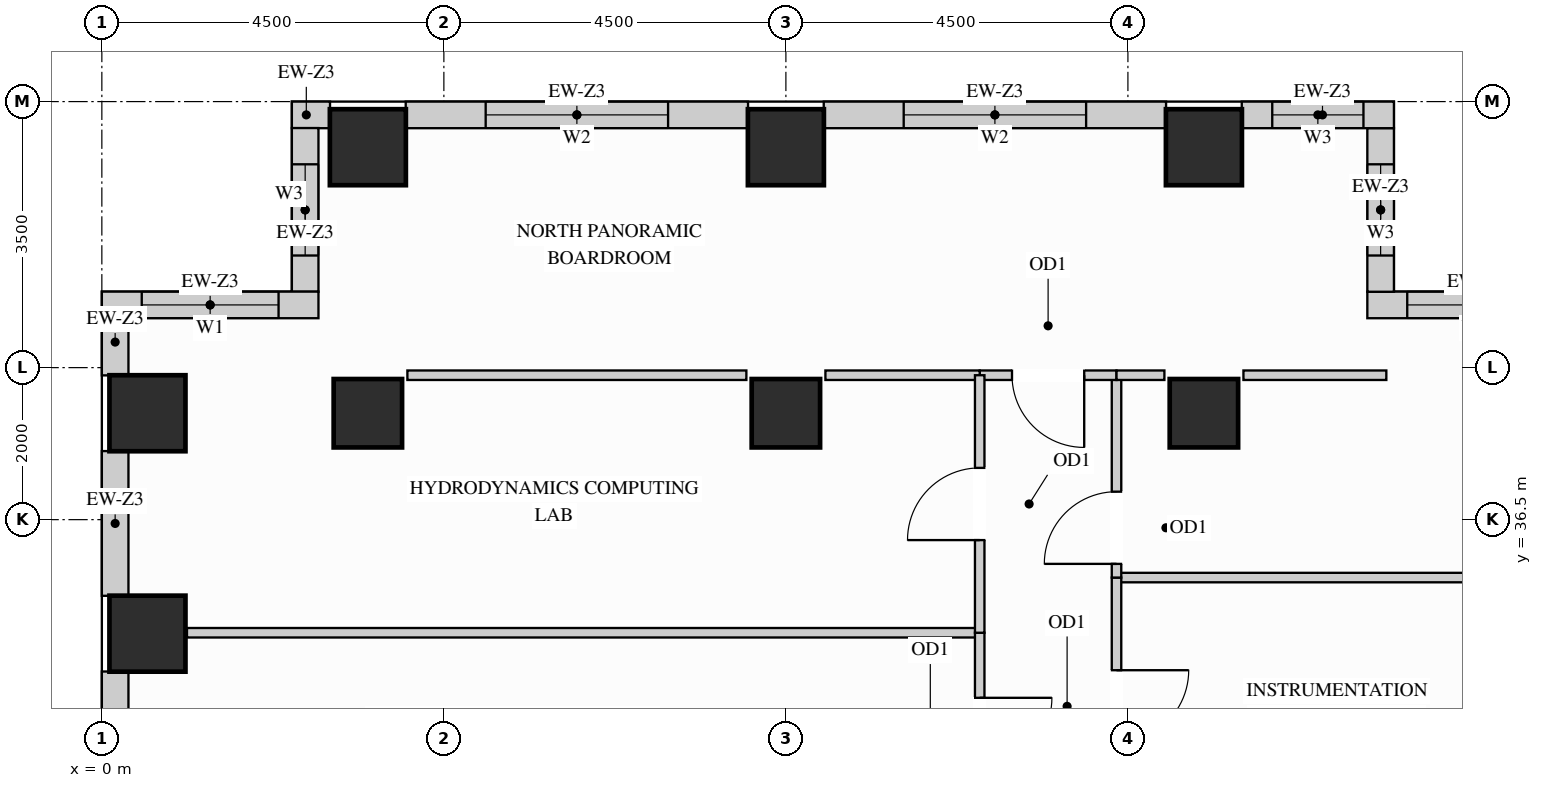
"""IFC4 building model, lengths in metres.
Left out: names, types, materials, properties, quantities, classifications, styles, units other than length and angle.
Written with IfcOpenShell. Run it as: python <this file> out.ifc"""

import sys

from ifc_helpers import new_model, si_unit, direction, frame, frame_2d, origin, origin_2d, place, context, subcontext, project, spatial, rectangle, extrude, source, transform, mapped, element, fill, save


model = new_model("IFC4")
c1 = context("Model", 3, precision=1e-05, world=origin(), true_north=direction((0.0, 1.0)))
c2 = subcontext(c1, "Body", "Model", "MODEL_VIEW")
j1 = project(units=[si_unit("LENGTHUNIT", "METRE"), si_unit("PLANEANGLEUNIT", "RADIAN")], contexts=[c1])
p1 = place(None, origin())
s1 = spatial("IfcSite", under=j1, at=p1, CompositionType="ELEMENT")
p2 = place(p1, origin())
s2 = spatial("IfcBuilding", under=s1, at=p2, CompositionType="ELEMENT")
p3 = place(p2, frame((0.0, 0.0, 161.1)))
s3 = spatial("IfcBuildingStorey", under=s2, at=p3, CompositionType="ELEMENT", Elevation=161.1)
m1 = source(origin(), c2, "Body", "SweptSolid", [
    extrude(rectangle(XDim=0.9, YDim=0.9, at=origin_2d()), origin(), (0.0, 0.0, 1.0), 3.4),
])
for number, where, z_axis, x_axis in (
    (1, (14.5, 37.9, 0.0), (0.0, 0.0, 1.0), (1.0, 0.0, 0.0)),
    (2, (3.5, 37.9, 0.0), (0.0, 0.0, 1.0), (1.0, 0.0, 0.0)),
    (3, (9.0, 37.9, 0.0), (0.0, 0.0, 1.0), (1.0, 0.0, 0.0)),
):
    element("IfcColumn", number, at=place(p3, frame(where, z_axis=z_axis, x_axis=x_axis)), inside=s3, PredefinedType="COLUMN", context=c2, shape_type="MappedRepresentation", body=[
        mapped(m1, transform((0.0, 0.0, 0.0), x_axis=(1.0, 0.0, 0.0), y_axis=(0.0, 1.0, 0.0), z_axis=(0.0, 0.0, 1.0))),
    ])
m2 = source(origin(), c2, "Body", "SweptSolid", [
    extrude(rectangle(XDim=1.0, YDim=1.0, at=origin_2d()), origin(), (0.0, 0.0, 1.0), 3.4),
])
for number, where, z_axis, x_axis in (
    (4, (14.5, 41.4, 0.0), (0.0, 0.0, 1.0), (1.0, 0.0, 0.0)),
    (5, (3.5, 41.4, 0.0), (0.0, 0.0, 1.0), (1.0, 0.0, 0.0)),
    (6, (9.0, 41.4, 0.0), (0.0, 0.0, 1.0), (1.0, 0.0, 0.0)),
    (7, (0.6, 35.0, 0.0), (0.0, 0.0, 1.0), (1.0, 0.0, 0.0)),
    (8, (0.6, 37.9, 0.0), (0.0, 0.0, 1.0), (1.0, 0.0, 0.0)),
):
    element("IfcColumn", number, at=place(p3, frame(where, z_axis=z_axis, x_axis=x_axis)), inside=s3, PredefinedType="COLUMN", context=c2, shape_type="MappedRepresentation", body=[
        mapped(m2, transform((0.0, 0.0, 0.0), x_axis=(1.0, 0.0, 0.0), y_axis=(0.0, 1.0, 0.0), z_axis=(0.0, 0.0, 1.0))),
    ])
p4 = place(p3, frame((19.5, 39.325, 0.0), z_axis=(0.0, 0.0, 1.0), x_axis=(-1.0, 0.0, 0.0)))
e9 = element("IfcWall", 9, at=p4, inside=s3, PredefinedType="SOLIDWALL", context=c2, shape_type="SweptSolid", body=[
    extrude(rectangle(XDim=2.85, YDim=0.35, at=frame_2d((1.425, 0.0))), origin(), (0.0, 0.0, 1.0), 3.385),
])
p5 = place(p4, frame((0.525, 0.0, 0.78)))
e10 = element("IfcOpeningElement", 10, at=p5, cuts=e9, PredefinedType="OPENING", context=c2, shape_type="SweptSolid", body=[
    extrude(rectangle(XDim=1.8, YDim=2.1, at=frame_2d((0.9, 1.05))), frame((0.0, 0.185, 0.0), z_axis=(0.0, -1.0, 0.0), x_axis=(1.0, 0.0, 0.0)), (0.0, 0.0, 1.0), 0.37),
])
p6 = place(p3, frame((16.825, 39.498, 0.0), z_axis=(0.0, 0.0, 1.0), x_axis=(0.0, 1.0, 0.0)))
e11 = element("IfcWall", 11, at=p6, inside=s3, PredefinedType="SOLIDWALL", context=c2, shape_type="SweptSolid", body=[
    extrude(rectangle(XDim=2.154, YDim=0.35, at=frame_2d((1.077, 0.0))), origin(), (0.0, 0.0, 1.0), 3.385),
])
p7 = place(p6, frame((0.477, 0.0, 0.78)))
e12 = element("IfcOpeningElement", 12, at=p7, cuts=e11, PredefinedType="OPENING", context=c2, shape_type="SweptSolid", body=[
    extrude(rectangle(XDim=1.2, YDim=2.1, at=frame_2d((0.6, 1.05))), frame((0.0, 0.185, 0.0), z_axis=(0.0, -1.0, 0.0), x_axis=(1.0, 0.0, 0.0)), (0.0, 0.0, 1.0), 0.37),
])
p8 = place(p3, frame((17.0, 41.825, 0.0), z_axis=(0.0, 0.0, 1.0), x_axis=(-1.0, 0.0, 0.0)))
e13 = element("IfcWall", 13, at=p8, inside=s3, PredefinedType="SOLIDWALL", context=c2, shape_type="SweptSolid", body=[
    extrude(rectangle(XDim=2.002, YDim=0.35, at=frame_2d((1.001, 0.0))), origin(), (0.0, 0.0, 1.0), 3.385),
])
p9 = place(p8, frame((0.401, 0.0, 0.78)))
e14 = element("IfcOpeningElement", 14, at=p9, cuts=e13, PredefinedType="OPENING", context=c2, shape_type="SweptSolid", body=[
    extrude(rectangle(XDim=1.2, YDim=2.1, at=frame_2d((0.6, 1.05))), frame((0.0, 0.185, 0.0), z_axis=(0.0, -1.0, 0.0), x_axis=(1.0, 0.0, 0.0)), (0.0, 0.0, 1.0), 0.37),
])
p10 = place(p3, frame((14.002, 41.825, 0.0), z_axis=(0.0, 0.0, 1.0), x_axis=(-1.0, 0.0, 0.0)))
e15 = element("IfcWall", 15, at=p10, inside=s3, PredefinedType="SOLIDWALL", context=c2, shape_type="SweptSolid", body=[
    extrude(rectangle(XDim=4.504, YDim=0.35, at=frame_2d((2.252, 0.0))), origin(), (0.0, 0.0, 1.0), 2.612),
])
p11 = place(p10, frame((1.052, 0.0, 0.78)))
e16 = element("IfcOpeningElement", 16, at=p11, cuts=e15, PredefinedType="OPENING", context=c2, shape_type="SweptSolid", body=[
    extrude(rectangle(XDim=2.4, YDim=1.652, at=frame_2d((1.2, 0.826))), frame((0.0, 0.185, 0.0), z_axis=(0.0, -1.0, 0.0), x_axis=(1.0, 0.0, 0.0)), (0.0, 0.0, 1.0), 0.37),
])
p12 = place(p3, frame((8.502, 41.825, 0.0), z_axis=(0.0, 0.0, 1.0), x_axis=(-1.0, 0.0, 0.0)))
e17 = element("IfcWall", 17, at=p12, inside=s3, PredefinedType="SOLIDWALL", context=c2, shape_type="SweptSolid", body=[
    extrude(rectangle(XDim=4.504, YDim=0.35, at=frame_2d((2.252, 0.0))), origin(), (0.0, 0.0, 1.0), 2.612),
])
p13 = place(p12, frame((1.052, 0.0, 0.78)))
e18 = element("IfcOpeningElement", 18, at=p13, cuts=e17, PredefinedType="OPENING", context=c2, shape_type="SweptSolid", body=[
    extrude(rectangle(XDim=2.4, YDim=1.652, at=frame_2d((1.2, 0.826))), frame((0.0, 0.185, 0.0), z_axis=(0.0, -1.0, 0.0), x_axis=(1.0, 0.0, 0.0)), (0.0, 0.0, 1.0), 0.37),
])
m3 = source(origin(), c2, "Body", "SweptSolid", [
    extrude(rectangle(XDim=0.502, YDim=0.35, at=frame_2d((0.251, 0.0))), origin(), (0.0, 0.0, 1.0), 3.385),
])
p14 = place(p3, frame((3.002, 41.825, 0.0), z_axis=(0.0, 0.0, 1.0), x_axis=(-1.0, 0.0, 0.0)))
e19 = element("IfcWall", 19, at=p14, inside=s3, PredefinedType="SOLIDWALL", context=c2, shape_type="MappedRepresentation", body=[
    mapped(m3, transform((0.0, 0.0, 0.0), x_axis=(1.0, 0.0, 0.0), y_axis=(0.0, 1.0, 0.0), z_axis=(0.0, 0.0, 1.0))),
])
p15 = place(p3, frame((2.675, 41.652, 0.0), z_axis=(0.0, 0.0, 1.0), x_axis=(0.0, -1.0, 0.0)))
e20 = element("IfcWall", 20, at=p15, inside=s3, PredefinedType="SOLIDWALL", context=c2, shape_type="SweptSolid", body=[
    extrude(rectangle(XDim=2.154, YDim=0.35, at=frame_2d((1.077, 0.0))), origin(), (0.0, 0.0, 1.0), 3.385),
])
p16 = place(p15, frame((0.477, 0.0, 0.78)))
e21 = element("IfcOpeningElement", 21, at=p16, cuts=e20, PredefinedType="OPENING", context=c2, shape_type="SweptSolid", body=[
    extrude(rectangle(XDim=1.2, YDim=2.1, at=frame_2d((0.6, 1.05))), frame((0.0, 0.185, 0.0), z_axis=(0.0, -1.0, 0.0), x_axis=(1.0, 0.0, 0.0)), (0.0, 0.0, 1.0), 0.37),
])
p17 = place(p3, frame((2.85, 39.325, 0.0), z_axis=(0.0, 0.0, 1.0), x_axis=(-1.0, 0.0, 0.0)))
e22 = element("IfcWall", 22, at=p17, inside=s3, PredefinedType="SOLIDWALL", context=c2, shape_type="SweptSolid", body=[
    extrude(rectangle(XDim=2.85, YDim=0.35, at=frame_2d((1.425, 0.0))), origin(), (0.0, 0.0, 1.0), 3.385),
])
p18 = place(p17, frame((0.525, 0.0, 0.78)))
e23 = element("IfcOpeningElement", 23, at=p18, cuts=e22, PredefinedType="OPENING", context=c2, shape_type="SweptSolid", body=[
    extrude(rectangle(XDim=1.8, YDim=2.1, at=frame_2d((0.9, 1.05))), frame((0.0, 0.185, 0.0), z_axis=(0.0, -1.0, 0.0), x_axis=(1.0, 0.0, 0.0)), (0.0, 0.0, 1.0), 0.37),
])
m4 = source(origin(), c2, "Body", "SweptSolid", [
    extrude(rectangle(XDim=0.754, YDim=0.35, at=frame_2d((0.377, 0.0))), origin(), (0.0, 0.0, 1.0), 3.385),
])
p19 = place(p3, frame((0.175, 39.152, 0.0), z_axis=(0.0, 0.0, 1.0), x_axis=(0.0, -1.0, 0.0)))
e24 = element("IfcWall", 24, at=p19, inside=s3, PredefinedType="SOLIDWALL", context=c2, shape_type="MappedRepresentation", body=[
    mapped(m4, transform((0.0, 0.0, 0.0), x_axis=(1.0, 0.0, 0.0), y_axis=(0.0, 1.0, 0.0), z_axis=(0.0, 0.0, 1.0))),
])
m5 = source(origin(), c2, "Body", "SweptSolid", [
    extrude(rectangle(XDim=1.904, YDim=0.35, at=frame_2d((0.952, 0.0))), origin(), (0.0, 0.0, 1.0), 2.612),
])
p20 = place(p3, frame((0.175, 37.402, 0.0), z_axis=(0.0, 0.0, 1.0), x_axis=(0.0, -1.0, 0.0)))
e25 = element("IfcWall", 25, at=p20, inside=s3, PredefinedType="SOLIDWALL", context=c2, shape_type="MappedRepresentation", body=[
    mapped(m5, transform((0.0, 0.0, 0.0), x_axis=(1.0, 0.0, 0.0), y_axis=(0.0, 1.0, 0.0), z_axis=(0.0, 0.0, 1.0))),
])
p21 = place(p3, frame((0.175, 34.502, 0.0), z_axis=(0.0, 0.0, 1.0), x_axis=(0.0, -1.0, 0.0)))
e26 = element("IfcWall", 26, at=p21, inside=s3, PredefinedType="SOLIDWALL", context=c2, shape_type="SweptSolid", body=[
    extrude(rectangle(XDim=3.504, YDim=0.35, at=frame_2d((1.752, 0.0))), origin(), (0.0, 0.0, 1.0), 2.612),
])
p22 = place(p21, frame((0.511, 0.0, 0.78)))
e27 = element("IfcOpeningElement", 27, at=p22, cuts=e26, PredefinedType="OPENING", context=c2, shape_type="SweptSolid", body=[
    extrude(rectangle(XDim=1.2, YDim=1.652, at=frame_2d((0.6, 0.826))), frame((0.0, 0.185, 0.0), z_axis=(0.0, -1.0, 0.0), x_axis=(1.0, 0.0, 0.0)), (0.0, 0.0, 1.0), 0.37),
])
m6 = source(origin(), c2, "Body", "SweptSolid", [
    extrude(rectangle(XDim=5.798, YDim=0.125, at=frame_2d((2.899, 0.0))), origin(), (0.0, 0.0, 1.0), 3.385),
])
p23 = place(p3, frame((13.35, 35.738, 0.0), z_axis=(0.0, 0.0, 1.0), x_axis=(1.0, 0.0, 0.0)))
e28 = element("IfcWall", 28, at=p23, inside=s3, PredefinedType="PARTITIONING", context=c2, shape_type="MappedRepresentation", body=[
    mapped(m6, transform((0.0, 0.0, 0.0), x_axis=(1.0, 0.0, 0.0), y_axis=(0.0, 1.0, 0.0), z_axis=(0.0, 0.0, 1.0))),
])
m7 = source(origin(), c2, "Body", "SweptSolid", [
    extrude(rectangle(XDim=10.43, YDim=0.125, at=frame_2d((5.215, 0.0))), origin(), (0.0, 0.0, 1.0), 3.385),
])
p24 = place(p3, frame((1.12, 35.012, 0.0), z_axis=(0.0, 0.0, 1.0), x_axis=(1.0, 0.0, 0.0)))
e29 = element("IfcWall", 29, at=p24, inside=s3, PredefinedType="PARTITIONING", context=c2, shape_type="MappedRepresentation", body=[
    mapped(m7, transform((0.0, 0.0, 0.0), x_axis=(1.0, 0.0, 0.0), y_axis=(0.0, 1.0, 0.0), z_axis=(0.0, 0.0, 1.0))),
])
p25 = place(p3, frame((13.35, 32.35, 0.0), z_axis=(0.0, 0.0, 1.0), x_axis=(0.0, 1.0, 0.0)))
e30 = element("IfcWall", 30, at=p25, inside=s3, PredefinedType="PARTITIONING", context=c2, shape_type="SweptSolid", body=[
    extrude(rectangle(XDim=3.388, YDim=0.125, at=frame_2d((1.694, 0.0))), origin(), (0.0, 0.0, 1.0), 3.385),
])
p26 = place(p25, frame((1.219, 0.0, 0.0)))
e31 = element("IfcOpeningElement", 31, at=p26, cuts=e30, PredefinedType="OPENING", context=c2, shape_type="SweptSolid", body=[
    extrude(rectangle(XDim=0.95, YDim=2.15, at=frame_2d((0.475, 1.075))), frame((0.0, 0.073, 0.0), z_axis=(0.0, -1.0, 0.0), x_axis=(1.0, 0.0, 0.0)), (0.0, 0.0, 1.0), 0.145),
])
p27 = place(p3, frame((13.35, 35.738, 0.0), z_axis=(0.0, 0.0, 1.0), x_axis=(0.0, 1.0, 0.0)))
e32 = element("IfcWall", 32, at=p27, inside=s3, PredefinedType="PARTITIONING", context=c2, shape_type="SweptSolid", body=[
    extrude(rectangle(XDim=2.662, YDim=0.125, at=frame_2d((1.331, 0.0))), origin(), (0.0, 0.0, 1.0), 3.385),
])
p28 = place(p27, frame((0.18, 0.0, 0.0)))
e33 = element("IfcOpeningElement", 33, at=p28, cuts=e32, PredefinedType="OPENING", context=c2, shape_type="SweptSolid", body=[
    extrude(rectangle(XDim=0.95, YDim=2.15, at=frame_2d((0.475, 1.075))), frame((0.0, 0.073, 0.0), z_axis=(0.0, -1.0, 0.0), x_axis=(1.0, 0.0, 0.0)), (0.0, 0.0, 1.0), 0.145),
])
p29 = place(p3, frame((11.55, 38.4, 0.0), z_axis=(0.0, 0.0, 1.0), x_axis=(1.0, 0.0, 0.0)))
e34 = element("IfcWall", 34, at=p29, inside=s3, PredefinedType="PARTITIONING", context=c2, shape_type="SweptSolid", body=[
    extrude(rectangle(XDim=1.8, YDim=0.125, at=frame_2d((0.9, 0.0))), origin(), (0.0, 0.0, 1.0), 3.385),
])
p30 = place(p29, frame((0.425, 0.0, 0.0)))
e35 = element("IfcOpeningElement", 35, at=p30, cuts=e34, PredefinedType="OPENING", context=c2, shape_type="SweptSolid", body=[
    extrude(rectangle(XDim=0.95, YDim=2.15, at=frame_2d((0.475, 1.075))), frame((0.0, 0.073, 0.0), z_axis=(0.0, -1.0, 0.0), x_axis=(1.0, 0.0, 0.0)), (0.0, 0.0, 1.0), 0.145),
])
m8 = source(origin(), c2, "Body", "SweptSolid", [
    extrude(rectangle(XDim=0.63, YDim=0.125, at=frame_2d((0.315, 0.0))), origin(), (0.0, 0.0, 1.0), 3.385),
])
p31 = place(p3, frame((13.35, 38.4, 0.0), z_axis=(0.0, 0.0, 1.0), x_axis=(1.0, 0.0, 0.0)))
e36 = element("IfcWall", 36, at=p31, inside=s3, PredefinedType="PARTITIONING", context=c2, shape_type="MappedRepresentation", body=[
    mapped(m8, transform((0.0, 0.0, 0.0), x_axis=(1.0, 0.0, 0.0), y_axis=(0.0, 1.0, 0.0), z_axis=(0.0, 0.0, 1.0))),
])
m9 = source(origin(), c2, "Body", "SweptSolid", [
    extrude(rectangle(XDim=1.88, YDim=0.125, at=frame_2d((0.94, 0.0))), origin(), (0.0, 0.0, 1.0), 3.385),
])
p32 = place(p3, frame((15.02, 38.4, 0.0), z_axis=(0.0, 0.0, 1.0), x_axis=(1.0, 0.0, 0.0)))
e37 = element("IfcWall", 37, at=p32, inside=s3, PredefinedType="PARTITIONING", context=c2, shape_type="MappedRepresentation", body=[
    mapped(m9, transform((0.0, 0.0, 0.0), x_axis=(1.0, 0.0, 0.0), y_axis=(0.0, 1.0, 0.0), z_axis=(0.0, 0.0, 1.0))),
])
m10 = source(origin(), c2, "Body", "SweptSolid", [
    extrude(rectangle(XDim=4.46, YDim=0.125, at=frame_2d((2.23, 0.0))), origin(), (0.0, 0.0, 1.0), 3.385),
])
p33 = place(p3, frame((4.02, 38.4, 0.0), z_axis=(0.0, 0.0, 1.0), x_axis=(1.0, 0.0, 0.0)))
e38 = element("IfcWall", 38, at=p33, inside=s3, PredefinedType="PARTITIONING", context=c2, shape_type="MappedRepresentation", body=[
    mapped(m10, transform((0.0, 0.0, 0.0), x_axis=(1.0, 0.0, 0.0), y_axis=(0.0, 1.0, 0.0), z_axis=(0.0, 0.0, 1.0))),
])
m11 = source(origin(), c2, "Body", "SweptSolid", [
    extrude(rectangle(XDim=2.03, YDim=0.125, at=frame_2d((1.015, 0.0))), origin(), (0.0, 0.0, 1.0), 3.385),
])
p34 = place(p3, frame((9.52, 38.4, 0.0), z_axis=(0.0, 0.0, 1.0), x_axis=(1.0, 0.0, 0.0)))
e39 = element("IfcWall", 39, at=p34, inside=s3, PredefinedType="PARTITIONING", context=c2, shape_type="MappedRepresentation", body=[
    mapped(m11, transform((0.0, 0.0, 0.0), x_axis=(1.0, 0.0, 0.0), y_axis=(0.0, 1.0, 0.0), z_axis=(0.0, 0.0, 1.0))),
])
p35 = place(p3, frame((11.55, 32.35, 0.0), z_axis=(0.0, 0.0, 1.0), x_axis=(0.0, 1.0, 0.0)))
e40 = element("IfcWall", 40, at=p35, inside=s3, PredefinedType="PARTITIONING", context=c2, shape_type="SweptSolid", body=[
    extrude(rectangle(XDim=2.662, YDim=0.125, at=frame_2d((1.331, 0.0))), origin(), (0.0, 0.0, 1.0), 3.385),
])
p36 = place(p35, frame((0.856, 0.0, 0.0)))
e41 = element("IfcOpeningElement", 41, at=p36, cuts=e40, PredefinedType="OPENING", context=c2, shape_type="SweptSolid", body=[
    extrude(rectangle(XDim=0.95, YDim=2.15, at=frame_2d((0.475, 1.075))), frame((0.0, 0.073, 0.0), z_axis=(0.0, -1.0, 0.0), x_axis=(1.0, 0.0, 0.0)), (0.0, 0.0, 1.0), 0.145),
])
p37 = place(p3, frame((11.55, 35.012, 0.0), z_axis=(0.0, 0.0, 1.0), x_axis=(0.0, 1.0, 0.0)))
e42 = element("IfcWall", 42, at=p37, inside=s3, PredefinedType="PARTITIONING", context=c2, shape_type="SweptSolid", body=[
    extrude(rectangle(XDim=3.388, YDim=0.125, at=frame_2d((1.694, 0.0))), origin(), (0.0, 0.0, 1.0), 3.385),
])
p38 = place(p37, frame((1.219, 0.0, 0.0)))
e43 = element("IfcOpeningElement", 43, at=p38, cuts=e42, PredefinedType="OPENING", context=c2, shape_type="SweptSolid", body=[
    extrude(rectangle(XDim=0.95, YDim=2.15, at=frame_2d((0.475, 1.075))), frame((0.0, 0.073, 0.0), z_axis=(0.0, -1.0, 0.0), x_axis=(1.0, 0.0, 0.0)), (0.0, 0.0, 1.0), 0.145),
])
m12 = source(origin(), c2, "Body", "SweptSolid", [
    extrude(rectangle(XDim=0.95, YDim=2.15, at=frame_2d((0.475, 1.075))), frame((0.0, 0.025, 0.0), z_axis=(0.0, -1.0, 0.0), x_axis=(1.0, 0.0, 0.0)), (0.0, 0.0, 1.0), 0.05),
])
p39 = place(p26, origin())
e44 = element("IfcDoor", 44, at=p39, inside=s3, OperationType="SINGLE_SWING_RIGHT", PredefinedType="DOOR", context=c2, shape_type="MappedRepresentation", body=[
    mapped(m12, transform((0.0, 0.0, 0.0), x_axis=(1.0, 0.0, 0.0), y_axis=(0.0, 1.0, 0.0), z_axis=(0.0, 0.0, 1.0))),
])
fill(e31, e44)
p40 = place(p28, origin())
e45 = element("IfcDoor", 45, at=p40, inside=s3, OperationType="SINGLE_SWING_LEFT", PredefinedType="DOOR", context=c2, shape_type="MappedRepresentation", body=[
    mapped(m12, transform((0.0, 0.0, 0.0), x_axis=(1.0, 0.0, 0.0), y_axis=(0.0, 1.0, 0.0), z_axis=(0.0, 0.0, 1.0))),
])
fill(e33, e45)
p41 = place(p30, origin())
e46 = element("IfcDoor", 46, at=p41, inside=s3, OperationType="SINGLE_SWING_RIGHT", PredefinedType="DOOR", context=c2, shape_type="MappedRepresentation", body=[
    mapped(m12, transform((0.0, 0.0, 0.0), x_axis=(1.0, 0.0, 0.0), y_axis=(0.0, 1.0, 0.0), z_axis=(0.0, 0.0, 1.0))),
])
fill(e35, e46)
p42 = place(p36, origin())
e47 = element("IfcDoor", 47, at=p42, inside=s3, OperationType="SINGLE_SWING_RIGHT", PredefinedType="DOOR", context=c2, shape_type="MappedRepresentation", body=[
    mapped(m12, transform((0.0, 0.0, 0.0), x_axis=(1.0, 0.0, 0.0), y_axis=(0.0, 1.0, 0.0), z_axis=(0.0, 0.0, 1.0))),
])
fill(e41, e47)
p43 = place(p38, origin())
e48 = element("IfcDoor", 48, at=p43, inside=s3, OperationType="SINGLE_SWING_LEFT", PredefinedType="DOOR", context=c2, shape_type="MappedRepresentation", body=[
    mapped(m12, transform((0.0, 0.0, 0.0), x_axis=(1.0, 0.0, 0.0), y_axis=(0.0, 1.0, 0.0), z_axis=(0.0, 0.0, 1.0))),
])
fill(e43, e48)
m13 = source(origin(), c2, "Body", "SweptSolid", [
    extrude(rectangle(XDim=1.8, YDim=2.1, at=frame_2d((0.9, 1.05))), frame((0.0, 0.03, 0.0), z_axis=(0.0, -1.0, 0.0), x_axis=(1.0, 0.0, 0.0)), (0.0, 0.0, 1.0), 0.06),
])
p44 = place(p5, origin())
e49 = element("IfcWindow", 49, at=p44, inside=s3, PartitioningType="SINGLE_PANEL", PredefinedType="WINDOW", context=c2, shape_type="MappedRepresentation", body=[
    mapped(m13, transform((0.0, 0.0, 0.0), x_axis=(1.0, 0.0, 0.0), y_axis=(0.0, 1.0, 0.0), z_axis=(0.0, 0.0, 1.0))),
])
fill(e10, e49)
p45 = place(p18, origin())
e50 = element("IfcWindow", 50, at=p45, inside=s3, PartitioningType="SINGLE_PANEL", PredefinedType="WINDOW", context=c2, shape_type="MappedRepresentation", body=[
    mapped(m13, transform((0.0, 0.0, 0.0), x_axis=(1.0, 0.0, 0.0), y_axis=(0.0, 1.0, 0.0), z_axis=(0.0, 0.0, 1.0))),
])
fill(e23, e50)
m14 = source(origin(), c2, "Body", "SweptSolid", [
    extrude(rectangle(XDim=2.4, YDim=1.652, at=frame_2d((1.2, 0.826))), frame((0.0, 0.03, 0.0), z_axis=(0.0, -1.0, 0.0), x_axis=(1.0, 0.0, 0.0)), (0.0, 0.0, 1.0), 0.06),
])
p46 = place(p11, origin())
e51 = element("IfcWindow", 51, at=p46, inside=s3, PartitioningType="SINGLE_PANEL", PredefinedType="WINDOW", context=c2, shape_type="MappedRepresentation", body=[
    mapped(m14, transform((0.0, 0.0, 0.0), x_axis=(1.0, 0.0, 0.0), y_axis=(0.0, 1.0, 0.0), z_axis=(0.0, 0.0, 1.0))),
])
fill(e16, e51)
p47 = place(p13, origin())
e52 = element("IfcWindow", 52, at=p47, inside=s3, PartitioningType="SINGLE_PANEL", PredefinedType="WINDOW", context=c2, shape_type="MappedRepresentation", body=[
    mapped(m14, transform((0.0, 0.0, 0.0), x_axis=(1.0, 0.0, 0.0), y_axis=(0.0, 1.0, 0.0), z_axis=(0.0, 0.0, 1.0))),
])
fill(e18, e52)
m15 = source(origin(), c2, "Body", "SweptSolid", [
    extrude(rectangle(XDim=1.2, YDim=2.1, at=frame_2d((0.6, 1.05))), frame((0.0, 0.03, 0.0), z_axis=(0.0, -1.0, 0.0), x_axis=(1.0, 0.0, 0.0)), (0.0, 0.0, 1.0), 0.06),
])
p48 = place(p7, origin())
e53 = element("IfcWindow", 53, at=p48, inside=s3, PartitioningType="SINGLE_PANEL", PredefinedType="WINDOW", context=c2, shape_type="MappedRepresentation", body=[
    mapped(m15, transform((0.0, 0.0, 0.0), x_axis=(1.0, 0.0, 0.0), y_axis=(0.0, 1.0, 0.0), z_axis=(0.0, 0.0, 1.0))),
])
fill(e12, e53)
p49 = place(p9, origin())
e54 = element("IfcWindow", 54, at=p49, inside=s3, PartitioningType="SINGLE_PANEL", PredefinedType="WINDOW", context=c2, shape_type="MappedRepresentation", body=[
    mapped(m15, transform((0.0, 0.0, 0.0), x_axis=(1.0, 0.0, 0.0), y_axis=(0.0, 1.0, 0.0), z_axis=(0.0, 0.0, 1.0))),
])
fill(e14, e54)
p50 = place(p16, origin())
e55 = element("IfcWindow", 55, at=p50, inside=s3, PartitioningType="SINGLE_PANEL", PredefinedType="WINDOW", context=c2, shape_type="MappedRepresentation", body=[
    mapped(m15, transform((0.0, 0.0, 0.0), x_axis=(1.0, 0.0, 0.0), y_axis=(0.0, 1.0, 0.0), z_axis=(0.0, 0.0, 1.0))),
])
fill(e21, e55)
save(model, sys.argv[1])
